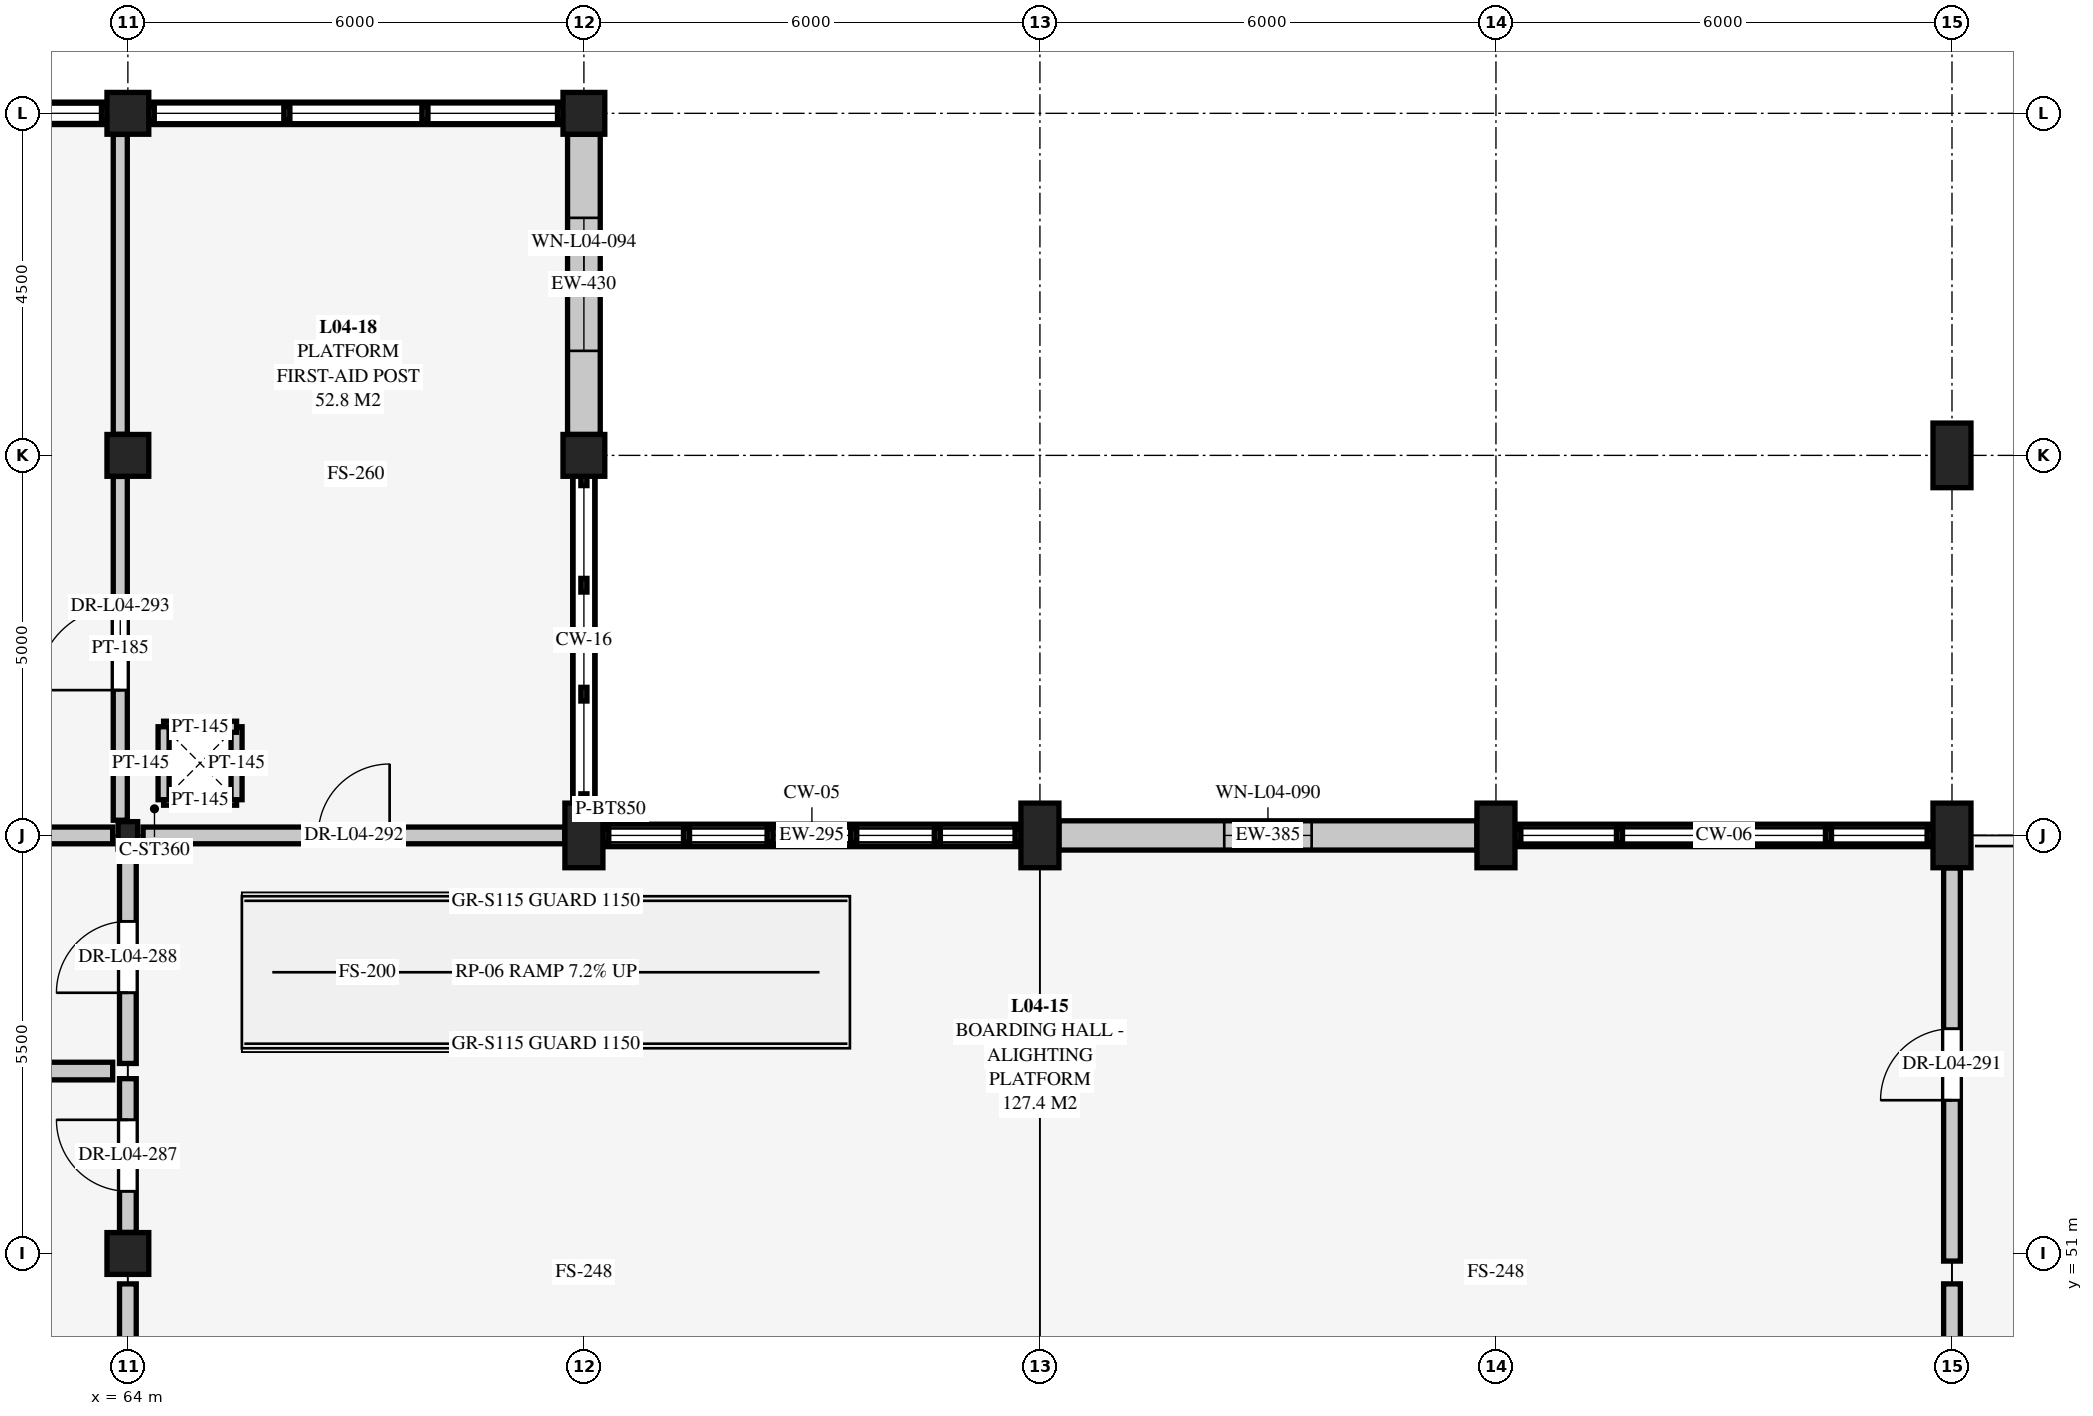
"""IFC4 building model, lengths in metres.
Left out: names, types, materials, properties, quantities, classifications, styles, units other than length and angle.
Written with IfcOpenShell. Run it as: python <this file> out.ifc"""

import sys

from ifc_helpers import new_model, si_unit, direction, frame, frame_2d, origin, origin_2d, place, context, subcontext, project, spatial, rectangle, i_section, extrude, element, fill, save


model = new_model("IFC4")
c1 = context("Model", 3, precision=1e-05, world=origin(), true_north=direction((0.0, 1.0)))
c2 = subcontext(c1, "Body", "Model", "MODEL_VIEW")
j1 = project(units=[si_unit("LENGTHUNIT", "METRE"), si_unit("PLANEANGLEUNIT", "RADIAN")], contexts=[c1])
p1 = place(None, origin())
s1 = spatial("IfcSite", under=j1, at=p1, CompositionType="ELEMENT")
p2 = place(p1, origin())
s2 = spatial("IfcBuilding", under=s1, at=p2, CompositionType="ELEMENT")
p3 = place(p2, frame((0.0, 0.0, 13.5)))
s3 = spatial("IfcBuildingStorey", under=s2, at=p3, CompositionType="ELEMENT", Elevation=13.5)
p4 = place(p3, frame((64.0, 51.0, 0.0), z_axis=(0.0, 0.0, 1.0), x_axis=(1.0, 0.0, 0.0)))
e1 = element("IfcColumn", 1, at=p4, inside=s3, PredefinedType="COLUMN", context=c2, shape_type="SweptSolid", body=[
    extrude(rectangle(XDim=0.55, YDim=0.55, at=origin_2d()), origin(), (0.0, 0.0, 1.0), 4.5),
])
p5 = place(p3, frame((64.0, 56.5, 0.0), z_axis=(0.0, 0.0, 1.0), x_axis=(1.0, 0.0, 0.0)))
e2 = element("IfcColumn", 2, at=p5, inside=s3, PredefinedType="COLUMN", context=c2, shape_type="SweptSolid", body=[
    extrude(i_section(OverallWidth=0.257, OverallDepth=0.363, WebThickness=0.013, FlangeThickness=0.022, at=origin_2d()), origin(), (0.0, 0.0, 1.0), 4.5),
])
for number, where, z_axis, x_axis in (
    (3, (64.0, 61.5, 0.0), (0.0, 0.0, 1.0), (1.0, 0.0, 0.0)),
    (4, (64.0, 66.0, 0.0), (0.0, 0.0, 1.0), (1.0, 0.0, 0.0)),
):
    element("IfcColumn", number, at=place(p3, frame(where, z_axis=z_axis, x_axis=x_axis)), inside=s3, PredefinedType="COLUMN", context=c2, shape_type="SweptSolid", body=[
        extrude(rectangle(XDim=0.55, YDim=0.55, at=origin_2d()), origin(), (0.0, 0.0, 1.0), 4.5),
    ])
p6 = place(p3, frame((70.0, 56.5, 0.0), z_axis=(0.0, 0.0, 1.0), x_axis=(1.0, 0.0, 0.0)))
e5 = element("IfcColumn", 5, at=p6, inside=s3, PredefinedType="PILASTER", context=c2, shape_type="SweptSolid", body=[
    extrude(rectangle(XDim=0.5, YDim=0.85, at=origin_2d()), origin(), (0.0, 0.0, 1.0), 4.5),
])
for number, where, z_axis, x_axis in (
    (6, (70.0, 61.5, 0.0), (0.0, 0.0, 1.0), (1.0, 0.0, 0.0)),
    (7, (70.0, 66.0, 0.0), (0.0, 0.0, 1.0), (1.0, 0.0, 0.0)),
):
    element("IfcColumn", number, at=place(p3, frame(where, z_axis=z_axis, x_axis=x_axis)), inside=s3, PredefinedType="COLUMN", context=c2, shape_type="SweptSolid", body=[
        extrude(rectangle(XDim=0.55, YDim=0.55, at=origin_2d()), origin(), (0.0, 0.0, 1.0), 4.5),
    ])
for number, where, z_axis, x_axis in (
    (8, (76.0, 56.5, 0.0), (0.0, 0.0, 1.0), (1.0, 0.0, 0.0)),
    (9, (82.0, 56.5, 0.0), (0.0, 0.0, 1.0), (1.0, 0.0, 0.0)),
    (10, (88.0, 56.5, 0.0), (0.0, 0.0, 1.0), (1.0, 0.0, 0.0)),
    (11, (88.0, 61.5, 0.0), (0.0, 0.0, 1.0), (1.0, 0.0, 0.0)),
):
    element("IfcColumn", number, at=place(p3, frame(where, z_axis=z_axis, x_axis=x_axis)), inside=s3, PredefinedType="PILASTER", context=c2, shape_type="SweptSolid", body=[
        extrude(rectangle(XDim=0.5, YDim=0.85, at=origin_2d()), origin(), (0.0, 0.0, 1.0), 4.5),
    ])
p7 = place(p3, frame((70.25, 56.5, 0.0), z_axis=(0.0, 0.0, 1.0), x_axis=(1.0, 0.0, 0.0)))
e12 = element("IfcWall", 12, at=p7, inside=s3, PredefinedType="SOLIDWALL", context=c2, shape_type="SweptSolid", body=[
    extrude(rectangle(XDim=5.5, YDim=0.295, at=frame_2d((2.75, 0.0))), origin(), (0.0, 0.0, 1.0), 0.36),
])
p8 = place(p3, frame((76.25, 56.5, 0.0), z_axis=(0.0, 0.0, 1.0), x_axis=(1.0, 0.0, 0.0)))
e13 = element("IfcWall", 13, at=p8, inside=s3, PredefinedType="SOLIDWALL", context=c2, shape_type="SweptSolid", body=[
    extrude(rectangle(XDim=5.5, YDim=0.385, at=frame_2d((2.75, 0.0))), origin(), (0.0, 0.0, 1.0), 8.593),
])
p9 = place(p8, frame((2.175, 0.0, 1.35)))
e14 = element("IfcOpeningElement", 14, at=p9, cuts=e13, PredefinedType="OPENING", context=c2, shape_type="SweptSolid", body=[
    extrude(rectangle(XDim=1.15, YDim=1.35, at=frame_2d((0.575, 0.675))), frame((0.0, 0.202, 0.0), z_axis=(0.0, -1.0, 0.0), x_axis=(1.0, 0.0, 0.0)), (0.0, 0.0, 1.0), 0.405),
])
p10 = place(p3, frame((82.25, 56.5, 0.0), z_axis=(0.0, 0.0, 1.0), x_axis=(1.0, 0.0, 0.0)))
e15 = element("IfcWall", 15, at=p10, inside=s3, PredefinedType="SOLIDWALL", context=c2, shape_type="SweptSolid", body=[
    extrude(rectangle(XDim=5.5, YDim=0.295, at=frame_2d((2.75, 0.0))), origin(), (0.0, 0.0, 1.0), 0.41),
])
p11 = place(p3, frame((58.275, 66.0, 0.0), z_axis=(0.0, 0.0, 1.0), x_axis=(1.0, 0.0, 0.0)))
e16 = element("IfcWall", 16, at=p11, inside=s3, PredefinedType="SOLIDWALL", context=c2, shape_type="SweptSolid", body=[
    extrude(rectangle(XDim=5.45, YDim=0.295, at=frame_2d((2.725, 0.0))), origin(), (0.0, 0.0, 1.0), 0.36),
])
p12 = place(p3, frame((64.275, 66.0, 0.0), z_axis=(0.0, 0.0, 1.0), x_axis=(1.0, 0.0, 0.0)))
e17 = element("IfcWall", 17, at=p12, inside=s3, PredefinedType="SOLIDWALL", context=c2, shape_type="SweptSolid", body=[
    extrude(rectangle(XDim=5.45, YDim=0.295, at=frame_2d((2.725, 0.0))), origin(), (0.0, 0.0, 1.0), 0.41),
])
p13 = place(p3, frame((70.0, 61.225, 0.0), z_axis=(0.0, 0.0, 1.0), x_axis=(0.0, -1.0, 0.0)))
e18 = element("IfcWall", 18, at=p13, inside=s3, PredefinedType="SOLIDWALL", context=c2, shape_type="SweptSolid", body=[
    extrude(rectangle(XDim=4.3, YDim=0.295, at=frame_2d((2.15, 0.0))), origin(), (0.0, 0.0, 1.0), 0.52),
])
p14 = place(p3, frame((70.0, 65.725, 0.0), z_axis=(0.0, 0.0, 1.0), x_axis=(0.0, -1.0, 0.0)))
e19 = element("IfcWall", 19, at=p14, inside=s3, PredefinedType="SOLIDWALL", context=c2, shape_type="SweptSolid", body=[
    extrude(rectangle(XDim=3.95, YDim=0.43, at=frame_2d((1.975, 0.0))), origin(), (0.0, 0.0, 1.0), 3.843),
])
p15 = place(p14, frame((1.1, 0.0, 1.25)))
e20 = element("IfcOpeningElement", 20, at=p15, cuts=e19, PredefinedType="OPENING", context=c2, shape_type="SweptSolid", body=[
    extrude(rectangle(XDim=1.75, YDim=1.5, at=frame_2d((0.875, 0.75))), frame((0.0, 0.225, 0.0), z_axis=(0.0, -1.0, 0.0), x_axis=(1.0, 0.0, 0.0)), (0.0, 0.0, 1.0), 0.45),
])
for number, where, z_axis, x_axis in (
    (21, (64.47, 56.97, 0.0), (0.0, 0.0, 1.0), (1.0, 0.0, 0.0)),
    (22, (65.43, 56.97, 0.0), (0.0, 0.0, 1.0), (0.0, 1.0, 0.0)),
    (23, (65.43, 57.93, 0.0), (0.0, 0.0, 1.0), (-1.0, 0.0, 0.0)),
    (24, (64.47, 57.93, 0.0), (0.0, 0.0, 1.0), (0.0, -1.0, 0.0)),
):
    element("IfcWall", number, at=place(p3, frame(where, z_axis=z_axis, x_axis=x_axis)), inside=s3, PredefinedType="PARTITIONING", context=c2, shape_type="SweptSolid", body=[
        extrude(rectangle(XDim=0.96, YDim=0.145, at=frame_2d((0.48, 0.0))), origin(), (0.0, 0.0, 1.0), 4.24),
    ])
p16 = place(p3, frame((59.0, 53.4, 0.0), z_axis=(0.0, 0.0, 1.0), x_axis=(1.0, 0.0, 0.0)))
e25 = element("IfcWall", 25, at=p16, inside=s3, PredefinedType="PARTITIONING", context=c2, shape_type="SweptSolid", body=[
    extrude(rectangle(XDim=4.8, YDim=0.232, at=frame_2d((2.4, 0.0))), origin(), (0.0, 0.0, 1.0), 4.264),
])
p17 = place(p16, frame((1.61, 0.0, 0.0)))
e26 = element("IfcOpeningElement", 26, at=p17, cuts=e25, PredefinedType="OPENING", context=c2, shape_type="SweptSolid", body=[
    extrude(rectangle(XDim=1.58, YDim=2.2, at=frame_2d((0.79, 1.1))), frame((0.0, 0.126, 0.0), z_axis=(0.0, -1.0, 0.0), x_axis=(1.0, 0.0, 0.0)), (0.0, 0.0, 1.0), 0.252),
])
p18 = place(p3, frame((64.0, 45.2, 0.0), z_axis=(0.0, 0.0, 1.0), x_axis=(0.0, 1.0, 0.0)))
e27 = element("IfcWall", 27, at=p18, inside=s3, PredefinedType="SOLIDWALL", context=c2, shape_type="SweptSolid", body=[
    extrude(rectangle(XDim=5.4, YDim=0.22, at=frame_2d((2.7, 0.0))), origin(), (0.0, 0.0, 1.0), 3.747),
])
p19 = place(p18, frame((2.23, 0.0, 0.0)))
e28 = element("IfcOpeningElement", 28, at=p19, cuts=e27, PredefinedType="OPENING", context=c2, shape_type="SweptSolid", body=[
    extrude(rectangle(XDim=0.94, YDim=2.1, at=frame_2d((0.47, 1.05))), frame((0.0, 0.12, 0.0), z_axis=(0.0, -1.0, 0.0), x_axis=(1.0, 0.0, 0.0)), (0.0, 0.0, 1.0), 0.24),
])
p20 = place(p3, frame((64.0, 51.277, 0.0), z_axis=(0.0, 0.0, 1.0), x_axis=(0.0, 1.0, 0.0)))
e29 = element("IfcWall", 29, at=p20, inside=s3, PredefinedType="SOLIDWALL", context=c2, shape_type="SweptSolid", body=[
    extrude(rectangle(XDim=2.023, YDim=0.22, at=frame_2d((1.011, 0.0))), origin(), (0.0, 0.0, 1.0), 3.896),
])
p21 = place(p20, frame((0.542, 0.0, 0.0)))
e30 = element("IfcOpeningElement", 30, at=p21, cuts=e29, PredefinedType="OPENING", context=c2, shape_type="SweptSolid", body=[
    extrude(rectangle(XDim=0.94, YDim=2.1, at=frame_2d((0.47, 1.05))), frame((0.0, 0.12, 0.0), z_axis=(0.0, -1.0, 0.0), x_axis=(1.0, 0.0, 0.0)), (0.0, 0.0, 1.0), 0.24),
])
p22 = place(p3, frame((64.0, 53.5, 0.0), z_axis=(0.0, 0.0, 1.0), x_axis=(0.0, 1.0, 0.0)))
e31 = element("IfcWall", 31, at=p22, inside=s3, PredefinedType="SOLIDWALL", context=c2, shape_type="SweptSolid", body=[
    extrude(rectangle(XDim=2.8, YDim=0.22, at=frame_2d((1.4, 0.0))), origin(), (0.0, 0.0, 1.0), 3.896),
])
p23 = place(p22, frame((0.93, 0.0, 0.0)))
e32 = element("IfcOpeningElement", 32, at=p23, cuts=e31, PredefinedType="OPENING", context=c2, shape_type="SweptSolid", body=[
    extrude(rectangle(XDim=0.94, YDim=2.1, at=frame_2d((0.47, 1.05))), frame((0.0, 0.12, 0.0), z_axis=(0.0, -1.0, 0.0), x_axis=(1.0, 0.0, 0.0)), (0.0, 0.0, 1.0), 0.24),
])
p24 = place(p3, frame((58.277, 56.5, 0.0), z_axis=(0.0, 0.0, 1.0), x_axis=(1.0, 0.0, 0.0)))
e33 = element("IfcWall", 33, at=p24, inside=s3, PredefinedType="SOLIDWALL", context=c2, shape_type="SweptSolid", body=[
    extrude(rectangle(XDim=5.523, YDim=0.22, at=frame_2d((2.761, 0.0))), origin(), (0.0, 0.0, 1.0), 3.896),
])
p25 = place(p24, frame((1.971, 0.0, 0.0)))
e34 = element("IfcOpeningElement", 34, at=p25, cuts=e33, PredefinedType="OPENING", context=c2, shape_type="SweptSolid", body=[
    extrude(rectangle(XDim=1.58, YDim=2.2, at=frame_2d((0.79, 1.1))), frame((0.0, 0.12, 0.0), z_axis=(0.0, -1.0, 0.0), x_axis=(1.0, 0.0, 0.0)), (0.0, 0.0, 1.0), 0.24),
])
p26 = place(p3, frame((88.0, 45.427, 0.0), z_axis=(0.0, 0.0, 1.0), x_axis=(0.0, 1.0, 0.0)))
e35 = element("IfcWall", 35, at=p26, inside=s3, PredefinedType="SOLIDWALL", context=c2, shape_type="SweptSolid", body=[
    extrude(rectangle(XDim=5.173, YDim=0.22, at=frame_2d((2.586, 0.0))), origin(), (0.0, 0.0, 1.0), 3.633),
])
p27 = place(p26, frame((2.116, 0.0, 0.0)))
e36 = element("IfcOpeningElement", 36, at=p27, cuts=e35, PredefinedType="OPENING", context=c2, shape_type="SweptSolid", body=[
    extrude(rectangle(XDim=0.94, YDim=2.1, at=frame_2d((0.47, 1.05))), frame((0.0, 0.12, 0.0), z_axis=(0.0, -1.0, 0.0), x_axis=(1.0, 0.0, 0.0)), (0.0, 0.0, 1.0), 0.24),
])
p28 = place(p3, frame((88.0, 50.9, 0.0), z_axis=(0.0, 0.0, 1.0), x_axis=(0.0, 1.0, 0.0)))
e37 = element("IfcWall", 37, at=p28, inside=s3, PredefinedType="SOLIDWALL", context=c2, shape_type="SweptSolid", body=[
    extrude(rectangle(XDim=5.173, YDim=0.22, at=frame_2d((2.586, 0.0))), origin(), (0.0, 0.0, 1.0), 3.633),
])
p29 = place(p28, frame((2.116, 0.0, 0.0)))
e38 = element("IfcOpeningElement", 38, at=p29, cuts=e37, PredefinedType="OPENING", context=c2, shape_type="SweptSolid", body=[
    extrude(rectangle(XDim=0.94, YDim=2.1, at=frame_2d((0.47, 1.05))), frame((0.0, 0.12, 0.0), z_axis=(0.0, -1.0, 0.0), x_axis=(1.0, 0.0, 0.0)), (0.0, 0.0, 1.0), 0.24),
])
p30 = place(p3, frame((64.2, 56.5, 0.0), z_axis=(0.0, 0.0, 1.0), x_axis=(1.0, 0.0, 0.0)))
e39 = element("IfcWall", 39, at=p30, inside=s3, PredefinedType="SOLIDWALL", context=c2, shape_type="SweptSolid", body=[
    extrude(rectangle(XDim=5.548, YDim=0.22, at=frame_2d((2.774, 0.0))), origin(), (0.0, 0.0, 1.0), 3.711),
])
p31 = place(p30, frame((2.304, 0.0, 0.0)))
e40 = element("IfcOpeningElement", 40, at=p31, cuts=e39, PredefinedType="OPENING", context=c2, shape_type="SweptSolid", body=[
    extrude(rectangle(XDim=0.94, YDim=2.1, at=frame_2d((0.47, 1.05))), frame((0.0, 0.12, 0.0), z_axis=(0.0, -1.0, 0.0), x_axis=(1.0, 0.0, 0.0)), (0.0, 0.0, 1.0), 0.24),
])
p32 = place(p3, frame((63.9, 56.7, 0.0), z_axis=(0.0, 0.0, 1.0), x_axis=(0.0, 1.0, 0.0)))
e41 = element("IfcWall", 41, at=p32, inside=s3, PredefinedType="PARTITIONING", context=c2, shape_type="SweptSolid", body=[
    extrude(rectangle(XDim=4.523, YDim=0.185, at=frame_2d((2.261, 0.0))), origin(), (0.0, 0.0, 1.0), 3.642),
])
p33 = place(p32, frame((1.711, 0.0, 0.0)))
e42 = element("IfcOpeningElement", 42, at=p33, cuts=e41, PredefinedType="OPENING", context=c2, shape_type="SweptSolid", body=[
    extrude(rectangle(XDim=1.1, YDim=2.2, at=frame_2d((0.55, 1.1))), frame((0.0, 0.103, 0.0), z_axis=(0.0, -1.0, 0.0), x_axis=(1.0, 0.0, 0.0)), (0.0, 0.0, 1.0), 0.205),
])
p34 = place(p3, frame((63.9, 61.777, 0.0), z_axis=(0.0, 0.0, 1.0), x_axis=(0.0, 1.0, 0.0)))
e43 = element("IfcWall", 43, at=p34, inside=s3, PredefinedType="PARTITIONING", context=c2, shape_type="SweptSolid", body=[
    extrude(rectangle(XDim=3.946, YDim=0.185, at=frame_2d((1.973, 0.0))), origin(), (0.0, 0.0, 1.0), 4.24),
])
p35 = place(p9, origin())
e44 = element("IfcWindow", 44, at=p35, inside=s3, PartitioningType="SINGLE_PANEL", PredefinedType="WINDOW", context=c2, shape_type="SweptSolid", body=[
    extrude(rectangle(XDim=1.15, YDim=1.35, at=frame_2d((0.575, 0.675))), frame((0.0, 0.03, 0.0), z_axis=(0.0, -1.0, 0.0), x_axis=(1.0, 0.0, 0.0)), (0.0, 0.0, 1.0), 0.06),
])
fill(e14, e44)
p36 = place(p15, origin())
e45 = element("IfcWindow", 45, at=p36, inside=s3, PartitioningType="SINGLE_PANEL", PredefinedType="WINDOW", context=c2, shape_type="SweptSolid", body=[
    extrude(rectangle(XDim=1.75, YDim=1.5, at=frame_2d((0.875, 0.75))), frame((0.0, 0.03, 0.0), z_axis=(0.0, -1.0, 0.0), x_axis=(1.0, 0.0, 0.0)), (0.0, 0.0, 1.0), 0.06),
])
fill(e20, e45)
p37 = place(p21, origin())
e46 = element("IfcDoor", 46, at=p37, inside=s3, OperationType="SINGLE_SWING_RIGHT", PredefinedType="DOOR", context=c2, shape_type="SweptSolid", body=[
    extrude(rectangle(XDim=0.94, YDim=2.1, at=frame_2d((0.47, 1.05))), frame((0.0, 0.025, 0.0), z_axis=(0.0, -1.0, 0.0), x_axis=(1.0, 0.0, 0.0)), (0.0, 0.0, 1.0), 0.05),
])
fill(e30, e46)
p38 = place(p23, origin())
e47 = element("IfcDoor", 47, at=p38, inside=s3, OperationType="SINGLE_SWING_LEFT", PredefinedType="DOOR", context=c2, shape_type="SweptSolid", body=[
    extrude(rectangle(XDim=0.94, YDim=2.1, at=frame_2d((0.47, 1.05))), frame((0.0, 0.025, 0.0), z_axis=(0.0, -1.0, 0.0), x_axis=(1.0, 0.0, 0.0)), (0.0, 0.0, 1.0), 0.05),
])
fill(e32, e47)
p39 = place(p29, origin())
e48 = element("IfcDoor", 48, at=p39, inside=s3, OperationType="SINGLE_SWING_LEFT", PredefinedType="DOOR", context=c2, shape_type="SweptSolid", body=[
    extrude(rectangle(XDim=0.94, YDim=2.1, at=frame_2d((0.47, 1.05))), frame((0.0, 0.025, 0.0), z_axis=(0.0, -1.0, 0.0), x_axis=(1.0, 0.0, 0.0)), (0.0, 0.0, 1.0), 0.05),
])
fill(e38, e48)
p40 = place(p31, origin())
e49 = element("IfcDoor", 49, at=p40, inside=s3, OperationType="SINGLE_SWING_RIGHT", PredefinedType="DOOR", context=c2, shape_type="SweptSolid", body=[
    extrude(rectangle(XDim=0.94, YDim=2.1, at=frame_2d((0.47, 1.05))), frame((0.0, 0.025, 0.0), z_axis=(0.0, -1.0, 0.0), x_axis=(1.0, 0.0, 0.0)), (0.0, 0.0, 1.0), 0.05),
])
fill(e40, e49)
p41 = place(p33, origin())
e50 = element("IfcDoor", 50, at=p41, inside=s3, OperationType="SINGLE_SWING_LEFT", PredefinedType="DOOR", context=c2, shape_type="SweptSolid", body=[
    extrude(rectangle(XDim=1.1, YDim=2.2, at=frame_2d((0.55, 1.1))), frame((0.0, 0.025, 0.0), z_axis=(0.0, -1.0, 0.0), x_axis=(1.0, 0.0, 0.0)), (0.0, 0.0, 1.0), 0.05),
])
fill(e42, e50)
save(model, sys.argv[1])
